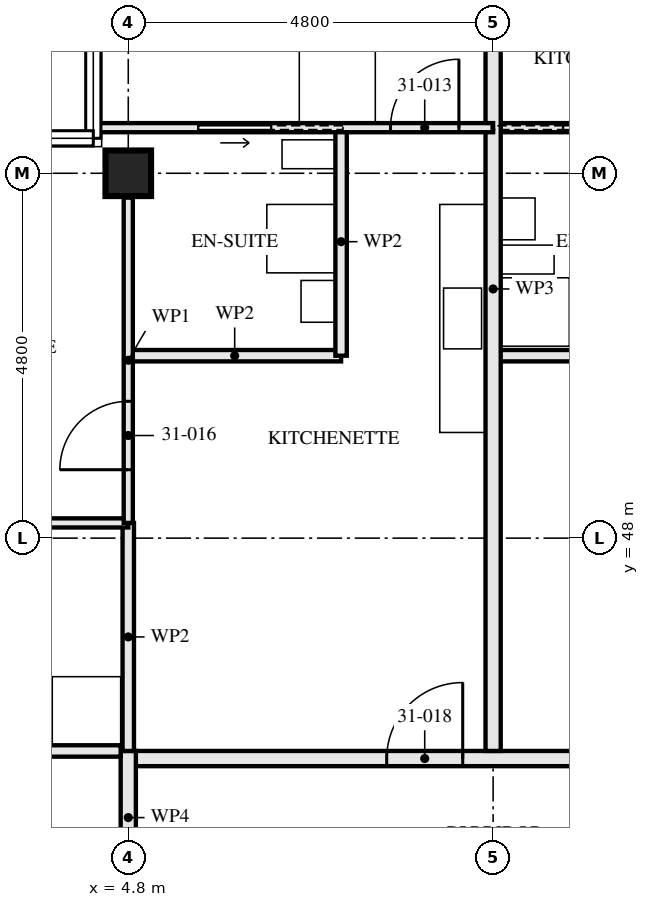
"""IFC4 building model, lengths in metres.
Left out: names, types, materials, properties, quantities, classifications, styles, units other than length and angle.
Written with IfcOpenShell. Run it as: python <this file> out.ifc"""

import sys

from ifc_helpers import new_model, si_unit, direction, frame, frame_2d, origin, origin_2d, place, context, subcontext, project, spatial, rectangle, hollow_rectangle, extrude, element, fill, save


model = new_model("IFC4")
c1 = context("Model", 3, precision=1e-05, world=origin(), true_north=direction((0.0, 1.0)))
c2 = subcontext(c1, "Body", "Model", "MODEL_VIEW")
j1 = project(units=[si_unit("LENGTHUNIT", "METRE"), si_unit("PLANEANGLEUNIT", "RADIAN")], contexts=[c1])
p1 = place(None, origin())
s1 = spatial("IfcSite", under=j1, at=p1, CompositionType="ELEMENT")
p2 = place(p1, origin())
s2 = spatial("IfcBuilding", under=s1, at=p2, CompositionType="ELEMENT")
p3 = place(p2, frame((0.0, 0.0, 115.5)))
s3 = spatial("IfcBuildingStorey", under=s2, at=p3, CompositionType="ELEMENT", Elevation=115.5)
p4 = place(p3, frame((4.8, 52.8, 0.0), z_axis=(0.0, 0.0, 1.0), x_axis=(0.0, 1.0, 0.0)))
e1 = element("IfcColumn", 1, at=p4, inside=s3, PredefinedType="COLUMN", context=c2, shape_type="SweptSolid", body=[
    extrude(hollow_rectangle(XDim=0.6, YDim=0.6, WallThickness=0.05, at=origin_2d()), origin(), (0.0, 0.0, 1.0), 3.5),
])
p5 = place(p3, frame((12.4, 50.4, 0.0), z_axis=(0.0, 0.0, 1.0), x_axis=(-1.0, 0.0, 0.0)))
e2 = element("IfcWall", 2, at=p5, inside=s3, PredefinedType="PARTITIONING", context=c2, shape_type="SweptSolid", body=[
    extrude(rectangle(XDim=2.8, YDim=0.15, at=frame_2d((1.4, 0.0))), origin(), (0.0, 0.0, 1.0), 3.33),
])
p6 = place(p3, frame((14.4, 53.4, 0.0), z_axis=(0.0, 0.0, 1.0), x_axis=(-1.0, 0.0, 0.0)))
e3 = element("IfcWall", 3, at=p6, inside=s3, PredefinedType="PARTITIONING", context=c2, shape_type="SweptSolid", body=[
    extrude(rectangle(XDim=4.8, YDim=0.12, at=frame_2d((2.4, 0.0))), origin(), (0.0, 0.0, 1.0), 3.33),
])
p7 = place(p6, frame((0.925, 0.0, 0.0)))
e4 = element("IfcOpeningElement", 4, at=p7, cuts=e3, PredefinedType="OPENING", context=c2, shape_type="SweptSolid", body=[
    extrude(rectangle(XDim=0.9, YDim=2.1, at=frame_2d((0.45, 1.05))), frame((0.0, 0.071, 0.0), z_axis=(0.0, -1.0, 0.0), x_axis=(1.0, 0.0, 0.0)), (0.0, 0.0, 1.0), 0.141),
])
p8 = place(p6, frame((2.925, 0.0, 0.0)))
e5 = element("IfcOpeningElement", 5, at=p8, cuts=e3, PredefinedType="OPENING", context=c2, shape_type="SweptSolid", body=[
    extrude(rectangle(XDim=0.95, YDim=2.1, at=frame_2d((0.475, 1.05))), frame((0.0, 0.071, 0.0), z_axis=(0.0, -1.0, 0.0), x_axis=(1.0, 0.0, 0.0)), (0.0, 0.0, 1.0), 0.141),
])
p9 = place(p3, frame((9.6, 57.356, 0.0), z_axis=(0.0, 0.0, 1.0), x_axis=(0.0, -1.0, 0.0)))
e6 = element("IfcWall", 6, at=p9, inside=s3, PredefinedType="PARTITIONING", context=c2, shape_type="SweptSolid", body=[
    extrude(rectangle(XDim=12.156, YDim=0.2, at=frame_2d((6.078, 0.0))), origin(), (0.0, 0.0, 1.0), 2.55),
])
p10 = place(p3, frame((7.6, 53.4, 0.0), z_axis=(0.0, 0.0, 1.0), x_axis=(0.0, -1.0, 0.0)))
e7 = element("IfcWall", 7, at=p10, inside=s3, PredefinedType="PARTITIONING", context=c2, shape_type="SweptSolid", body=[
    extrude(rectangle(XDim=3.0, YDim=0.15, at=frame_2d((1.5, 0.0))), origin(), (0.0, 0.0, 1.0), 2.55),
])
p11 = place(p3, frame((7.6, 50.4, 0.0), z_axis=(0.0, 0.0, 1.0), x_axis=(-1.0, 0.0, 0.0)))
e8 = element("IfcWall", 8, at=p11, inside=s3, PredefinedType="PARTITIONING", context=c2, shape_type="SweptSolid", body=[
    extrude(rectangle(XDim=2.8, YDim=0.15, at=frame_2d((1.4, 0.0))), origin(), (0.0, 0.0, 1.0), 3.33),
])
p12 = place(p3, frame((4.8, 48.2, 0.0), z_axis=(0.0, 0.0, 1.0), x_axis=(0.0, -1.0, 0.0)))
e9 = element("IfcWall", 9, at=p12, inside=s3, PredefinedType="PARTITIONING", context=c2, shape_type="SweptSolid", body=[
    extrude(rectangle(XDim=3.0, YDim=0.15, at=frame_2d((1.5, 0.0))), origin(), (0.0, 0.0, 1.0), 2.55),
])
p13 = place(p3, frame((9.6, 53.4, 0.0), z_axis=(0.0, 0.0, 1.0), x_axis=(-1.0, 0.0, 0.0)))
e10 = element("IfcWall", 10, at=p13, inside=s3, PredefinedType="PARTITIONING", context=c2, shape_type="SweptSolid", body=[
    extrude(rectangle(XDim=5.24, YDim=0.12, at=frame_2d((2.62, 0.0))), origin(), (0.0, 0.0, 1.0), 2.32),
])
p14 = place(p13, frame((0.45, 0.0, 0.0)))
e11 = element("IfcOpeningElement", 11, at=p14, cuts=e10, PredefinedType="OPENING", context=c2, shape_type="SweptSolid", body=[
    extrude(rectangle(XDim=0.9, YDim=2.1, at=frame_2d((0.45, 1.05))), frame((0.0, 0.071, 0.0), z_axis=(0.0, -1.0, 0.0), x_axis=(1.0, 0.0, 0.0)), (0.0, 0.0, 1.0), 0.141),
])
p15 = place(p13, frame((2.925, 0.0, 0.0)))
e12 = element("IfcOpeningElement", 12, at=p15, cuts=e10, PredefinedType="OPENING", context=c2, shape_type="SweptSolid", body=[
    extrude(rectangle(XDim=0.95, YDim=2.1, at=frame_2d((0.475, 1.05))), frame((0.0, 0.071, 0.0), z_axis=(0.0, -1.0, 0.0), x_axis=(1.0, 0.0, 0.0)), (0.0, 0.0, 1.0), 0.141),
])
p16 = place(p3, frame((4.8, 48.2, 0.0), z_axis=(0.0, 0.0, 1.0), x_axis=(-1.0, 0.0, 0.0)))
e13 = element("IfcWall", 13, at=p16, inside=s3, PredefinedType="PARTITIONING", context=c2, shape_type="SweptSolid", body=[
    extrude(rectangle(XDim=4.556, YDim=0.12, at=frame_2d((2.278, 0.0))), origin(), (0.0, 0.0, 1.0), 3.33),
])
p17 = place(p16, frame((1.925, 0.0, 0.0)))
e14 = element("IfcOpeningElement", 14, at=p17, cuts=e13, PredefinedType="OPENING", context=c2, shape_type="SweptSolid", body=[
    extrude(rectangle(XDim=0.95, YDim=2.1, at=frame_2d((0.475, 1.05))), frame((0.0, 0.071, 0.0), z_axis=(0.0, -1.0, 0.0), x_axis=(1.0, 0.0, 0.0)), (0.0, 0.0, 1.0), 0.141),
])
p18 = place(p3, frame((4.8, 52.48, 0.0), z_axis=(0.0, 0.0, 1.0), x_axis=(0.0, -1.0, 0.0)))
e15 = element("IfcWall", 15, at=p18, inside=s3, PredefinedType="PARTITIONING", context=c2, shape_type="SweptSolid", body=[
    extrude(rectangle(XDim=4.28, YDim=0.12, at=frame_2d((2.14, 0.0))), origin(), (0.0, 0.0, 1.0), 3.33),
])
p19 = place(p18, frame((2.68, 0.0, 0.0)))
e16 = element("IfcOpeningElement", 16, at=p19, cuts=e15, PredefinedType="OPENING", context=c2, shape_type="SweptSolid", body=[
    extrude(rectangle(XDim=0.9, YDim=2.1, at=frame_2d((0.45, 1.05))), frame((0.0, 0.071, 0.0), z_axis=(0.0, -1.0, 0.0), x_axis=(1.0, 0.0, 0.0)), (0.0, 0.0, 1.0), 0.141),
])
p20 = place(p3, frame((14.4, 45.1, 0.0), z_axis=(0.0, 0.0, 1.0), x_axis=(-1.0, 0.0, 0.0)))
e17 = element("IfcWall", 17, at=p20, inside=s3, PredefinedType="PARTITIONING", context=c2, shape_type="SweptSolid", body=[
    extrude(rectangle(XDim=9.6, YDim=0.2, at=frame_2d((4.8, 0.0))), origin(), (0.0, 0.0, 1.0), 3.33),
])
p21 = place(p20, frame((0.4, 0.0, 0.0)))
e18 = element("IfcOpeningElement", 18, at=p21, cuts=e17, PredefinedType="OPENING", context=c2, shape_type="SweptSolid", body=[
    extrude(rectangle(XDim=1.0, YDim=2.1, at=frame_2d((0.5, 1.05))), frame((0.0, 0.111, 0.0), z_axis=(0.0, -1.0, 0.0), x_axis=(1.0, 0.0, 0.0)), (0.0, 0.0, 1.0), 0.221),
])
p22 = place(p20, frame((5.2, 0.0, 0.0)))
e19 = element("IfcOpeningElement", 19, at=p22, cuts=e17, PredefinedType="OPENING", context=c2, shape_type="SweptSolid", body=[
    extrude(rectangle(XDim=1.0, YDim=2.1, at=frame_2d((0.5, 1.05))), frame((0.0, 0.111, 0.0), z_axis=(0.0, -1.0, 0.0), x_axis=(1.0, 0.0, 0.0)), (0.0, 0.0, 1.0), 0.221),
])
p23 = place(p3, frame((4.8, 45.2, 0.0), z_axis=(0.0, 0.0, 1.0), x_axis=(0.0, -1.0, 0.0)))
e20 = element("IfcWall", 20, at=p23, inside=s3, PredefinedType="PARTITIONING", context=c2, shape_type="SweptSolid", body=[
    extrude(rectangle(XDim=1.753, YDim=0.2, at=frame_2d((0.876, 0.0))), origin(), (0.0, 0.0, 1.0), 3.33),
])
p24 = place(p3, frame((4.7, 45.2, 0.0), z_axis=(0.0, 0.0, 1.0), x_axis=(-1.0, 0.0, 0.0)))
e21 = element("IfcWall", 21, at=p24, inside=s3, PredefinedType="PARTITIONING", context=c2, shape_type="SweptSolid", body=[
    extrude(rectangle(XDim=5.14, YDim=0.15, at=frame_2d((2.57, 0.0))), origin(), (0.0, 0.0, 1.0), 2.32),
])
p25 = place(p8, origin())
e22 = element("IfcDoor", 22, at=p25, inside=s3, OperationType="SLIDING_TO_LEFT", PredefinedType="DOOR", context=c2, shape_type="SweptSolid", body=[
    extrude(rectangle(XDim=0.95, YDim=2.1, at=frame_2d((0.475, 1.05))), frame((0.0, 0.022, 0.0), z_axis=(0.0, -1.0, 0.0), x_axis=(1.0, 0.0, 0.0)), (0.0, 0.0, 1.0), 0.044),
])
fill(e5, e22)
p26 = place(p14, frame((0.9, 0.0, 0.0), z_axis=(0.0, 0.0, 1.0), x_axis=(-1.0, 0.0, 0.0)))
e23 = element("IfcDoor", 23, at=p26, inside=s3, OperationType="SINGLE_SWING_LEFT", PredefinedType="DOOR", context=c2, shape_type="SweptSolid", body=[
    extrude(rectangle(XDim=0.9, YDim=2.1, at=frame_2d((0.45, 1.05))), frame((0.0, 0.022, 0.0), z_axis=(0.0, -1.0, 0.0), x_axis=(1.0, 0.0, 0.0)), (0.0, 0.0, 1.0), 0.044),
])
fill(e11, e23)
p27 = place(p15, origin())
e24 = element("IfcDoor", 24, at=p27, inside=s3, OperationType="SLIDING_TO_RIGHT", PredefinedType="DOOR", context=c2, shape_type="SweptSolid", body=[
    extrude(rectangle(XDim=0.95, YDim=2.1, at=frame_2d((0.475, 1.05))), frame((0.0, 0.022, 0.0), z_axis=(0.0, -1.0, 0.0), x_axis=(1.0, 0.0, 0.0)), (0.0, 0.0, 1.0), 0.044),
])
fill(e12, e24)
p28 = place(p19, frame((0.9, 0.0, 0.0), z_axis=(0.0, 0.0, 1.0), x_axis=(-1.0, 0.0, 0.0)))
e25 = element("IfcDoor", 25, at=p28, inside=s3, OperationType="SINGLE_SWING_RIGHT", PredefinedType="DOOR", context=c2, shape_type="SweptSolid", body=[
    extrude(rectangle(XDim=0.9, YDim=2.1, at=frame_2d((0.45, 1.05))), frame((0.0, 0.022, 0.0), z_axis=(0.0, -1.0, 0.0), x_axis=(1.0, 0.0, 0.0)), (0.0, 0.0, 1.0), 0.044),
])
fill(e16, e25)
p29 = place(p22, frame((1.0, 0.0, 0.0), z_axis=(0.0, 0.0, 1.0), x_axis=(-1.0, 0.0, 0.0)))
e26 = element("IfcDoor", 26, at=p29, inside=s3, OperationType="SINGLE_SWING_LEFT", PredefinedType="DOOR", context=c2, shape_type="SweptSolid", body=[
    extrude(rectangle(XDim=1.0, YDim=2.1, at=frame_2d((0.5, 1.05))), frame((0.0, 0.027, 0.0), z_axis=(0.0, -1.0, 0.0), x_axis=(1.0, 0.0, 0.0)), (0.0, 0.0, 1.0), 0.054),
])
fill(e19, e26)
save(model, sys.argv[1])
